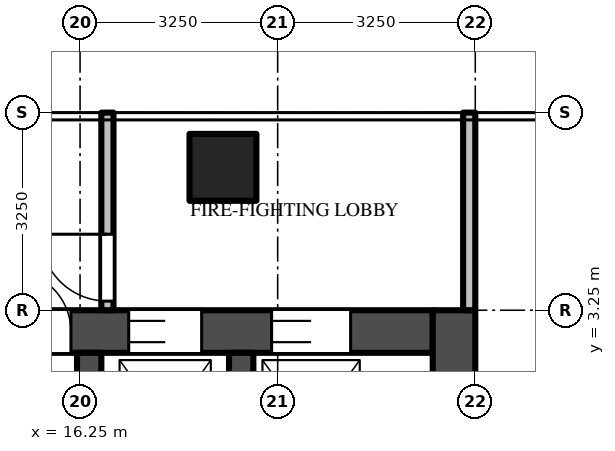
"""IFC4 building model, lengths in metres.
Left out: names, types, materials, properties, quantities, classifications, styles, units other than length and angle.
Written with IfcOpenShell. Run it as: python <this file> out.ifc"""

import sys

from ifc_helpers import new_model, si_unit, direction, frame, frame_2d, origin, origin_2d, place, context, subcontext, project, spatial, rectangle, extrude, source, transform, mapped, element, fill, save


model = new_model("IFC4")
c1 = context("Model", 3, precision=1e-05, world=origin(), true_north=direction((0.0, 1.0)))
c2 = subcontext(c1, "Body", "Model", "MODEL_VIEW")
j1 = project(units=[si_unit("LENGTHUNIT", "METRE"), si_unit("PLANEANGLEUNIT", "RADIAN")], contexts=[c1])
p1 = place(None, origin())
s1 = spatial("IfcSite", under=j1, at=p1, CompositionType="ELEMENT")
p2 = place(p1, origin())
s2 = spatial("IfcBuilding", under=s1, at=p2, CompositionType="ELEMENT")
p3 = place(p2, frame((0.0, 0.0, 212.7)))
s3 = spatial("IfcBuildingStorey", under=s2, at=p3, CompositionType="ELEMENT", Elevation=212.7)
m1 = source(origin(), c2, "Body", "SweptSolid", [
    extrude(rectangle(XDim=1.1, YDim=1.1, at=origin_2d()), origin(), (0.0, 0.0, 1.0), 8.0),
])
p4 = place(p3, frame((18.6, 5.6, 0.0), z_axis=(0.0, 0.0, 1.0), x_axis=(1.0, 0.0, 0.0)))
e1 = element("IfcColumn", 1, at=p4, inside=s3, PredefinedType="COLUMN", context=c2, shape_type="MappedRepresentation", body=[
    mapped(m1, transform((0.0, 0.0, 0.0))),
])
m2 = source(origin(), c2, "Body", "SweptSolid", [
    extrude(rectangle(XDim=14.85, YDim=0.7, at=frame_2d((7.425, 0.0))), origin(), (0.0, 0.0, 1.0), 7.8),
])
p5 = place(p3, frame((7.2, 2.9, 0.0), z_axis=(0.0, 0.0, 1.0), x_axis=(1.0, 0.0, 0.0)))
e2 = element("IfcWall", 2, at=p5, inside=s3, PredefinedType="SHEAR", context=c2, shape_type="MappedRepresentation", body=[
    mapped(m2, transform((0.0, 0.0, 0.0))),
])
m3 = source(origin(), c2, "Body", "SweptSolid", [
    extrude(rectangle(XDim=1.1, YDim=2.1, at=frame_2d((0.55, 1.05))), frame((0.0, 0.36, 0.0), z_axis=(0.0, -1.0, 0.0), x_axis=(1.0, 0.0, 0.0)), (0.0, 0.0, 1.0), 0.72),
])
p6 = place(p5, frame((0.55, 0.0, 0.0)))
e3 = element("IfcOpeningElement", 3, at=p6, cuts=e2, PredefinedType="OPENING", context=c2, shape_type="MappedRepresentation", body=[
    mapped(m3, transform((0.0, 0.0, 0.0))),
])
p7 = place(p5, frame((3.15, 0.0, 0.0)))
e4 = element("IfcOpeningElement", 4, at=p7, cuts=e2, PredefinedType="OPENING", context=c2, shape_type="MappedRepresentation", body=[
    mapped(m3, transform((0.0, 0.0, 0.0))),
])
m4 = source(origin(), c2, "Body", "SweptSolid", [
    extrude(rectangle(XDim=1.2, YDim=2.1, at=frame_2d((0.6, 1.05))), frame((0.0, 0.36, 0.0), z_axis=(0.0, -1.0, 0.0), x_axis=(1.0, 0.0, 0.0)), (0.0, 0.0, 1.0), 0.72),
])
p8 = place(p5, frame((5.7, 0.0, 0.0)))
e5 = element("IfcOpeningElement", 5, at=p8, cuts=e2, PredefinedType="OPENING", context=c2, shape_type="MappedRepresentation", body=[
    mapped(m4, transform((0.0, 0.0, 0.0))),
])
m5 = source(origin(), c2, "Body", "SweptSolid", [
    extrude(rectangle(XDim=1.3, YDim=2.1, at=frame_2d((0.65, 1.05))), frame((0.0, 0.36, 0.0), z_axis=(0.0, -1.0, 0.0), x_axis=(1.0, 0.0, 0.0)), (0.0, 0.0, 1.0), 0.72),
])
p9 = place(p5, frame((12.2, 0.0, 0.0)))
e6 = element("IfcOpeningElement", 6, at=p9, cuts=e2, PredefinedType="OPENING", context=c2, shape_type="MappedRepresentation", body=[
    mapped(m5, transform((0.0, 0.0, 0.0))),
])
p10 = place(p5, frame((9.85, 0.0, 0.0)))
e7 = element("IfcOpeningElement", 7, at=p10, cuts=e2, PredefinedType="OPENING", context=c2, shape_type="MappedRepresentation", body=[
    mapped(m4, transform((0.0, 0.0, 0.0))),
])
m6 = source(origin(), c2, "Body", "SweptSolid", [
    extrude(rectangle(XDim=1.0, YDim=2.1, at=frame_2d((0.5, 1.05))), frame((0.0, 0.36, 0.0), z_axis=(0.0, -1.0, 0.0), x_axis=(1.0, 0.0, 0.0)), (0.0, 0.0, 1.0), 0.72),
])
p11 = place(p5, frame((7.9, 0.0, 0.0)))
e8 = element("IfcOpeningElement", 8, at=p11, cuts=e2, PredefinedType="OPENING", context=c2, shape_type="MappedRepresentation", body=[
    mapped(m6, transform((0.0, 0.0, 0.0))),
])
m7 = source(origin(), c2, "Body", "SweptSolid", [
    extrude(rectangle(XDim=9.05, YDim=0.7, at=frame_2d((4.525, 0.0))), origin(), (0.0, 0.0, 1.0), 7.8),
])
p12 = place(p3, frame((22.4, -5.8, 0.0), z_axis=(0.0, 0.0, 1.0), x_axis=(0.0, 1.0, 0.0)))
e9 = element("IfcWall", 9, at=p12, inside=s3, PredefinedType="SHEAR", context=c2, shape_type="MappedRepresentation", body=[
    mapped(m7, transform((0.0, 0.0, 0.0))),
])
m8 = source(origin(), c2, "Body", "SweptSolid", [
    extrude(rectangle(XDim=2.45, YDim=0.4, at=frame_2d((1.225, 0.0))), origin(), (0.0, 0.0, 1.0), 7.8),
])
for number, where, z_axis, x_axis in (
    (10, (16.4, 0.1, 0.0), (0.0, 0.0, 1.0), (0.0, 1.0, 0.0)),
    (11, (18.9, 0.1, 0.0), (0.0, 0.0, 1.0), (0.0, 1.0, 0.0)),
):
    element("IfcWall", number, at=place(p3, frame(where, z_axis=z_axis, x_axis=x_axis)), inside=s3, PredefinedType="SHEAR", context=c2, shape_type="MappedRepresentation", body=[
        mapped(m8, transform((0.0, 0.0, 0.0))),
    ])
m9 = source(origin(), c2, "Body", "SweptSolid", [
    extrude(rectangle(XDim=3.25, YDim=0.2, at=frame_2d((1.625, 0.0))), origin(), (0.0, 0.0, 1.0), 7.8),
])
p13 = place(p3, frame((16.7, 3.25, 0.0), z_axis=(0.0, 0.0, 1.0), x_axis=(0.0, 1.0, 0.0)))
e12 = element("IfcWall", 12, at=p13, inside=s3, PredefinedType="PARTITIONING", context=c2, shape_type="MappedRepresentation", body=[
    mapped(m9, transform((0.0, 0.0, 0.0))),
])
m10 = source(origin(), c2, "Body", "SweptSolid", [
    extrude(rectangle(XDim=1.1, YDim=2.1, at=frame_2d((0.55, 1.05))), frame((0.0, 0.11, 0.0), z_axis=(0.0, -1.0, 0.0), x_axis=(1.0, 0.0, 0.0)), (0.0, 0.0, 1.0), 0.22),
])
p14 = place(p13, frame((0.15, 0.0, 0.0)))
e13 = element("IfcOpeningElement", 13, at=p14, cuts=e12, PredefinedType="OPENING", context=c2, shape_type="MappedRepresentation", body=[
    mapped(m10, transform((0.0, 0.0, 0.0))),
])
p15 = place(p3, frame((22.65, 3.25, 0.0), z_axis=(0.0, 0.0, 1.0), x_axis=(0.0, 1.0, 0.0)))
e14 = element("IfcWall", 14, at=p15, inside=s3, PredefinedType="PARTITIONING", context=c2, shape_type="MappedRepresentation", body=[
    mapped(m9, transform((0.0, 0.0, 0.0))),
])
m11 = source(origin(), c2, "Body", "SweptSolid", [
    extrude(rectangle(XDim=1.3, YDim=2.1, at=frame_2d((0.65, 1.05))), frame((0.0, -0.275, 0.0), z_axis=(0.0, -1.0, 0.0), x_axis=(1.0, 0.0, 0.0)), (0.0, 0.0, 1.0), 0.05),
])
p16 = place(p9, origin())
e15 = element("IfcDoor", 15, at=p16, inside=s3, OperationType="DOUBLE_DOOR_SLIDING", PredefinedType="DOOR", context=c2, shape_type="MappedRepresentation", body=[
    mapped(m11, transform((0.0, 0.0, 0.0))),
])
fill(e6, e15)
m12 = source(origin(), c2, "Body", "SweptSolid", [
    extrude(rectangle(XDim=1.2, YDim=2.1, at=frame_2d((0.6, 1.05))), frame((0.0, -0.275, 0.0), z_axis=(0.0, -1.0, 0.0), x_axis=(1.0, 0.0, 0.0)), (0.0, 0.0, 1.0), 0.05),
])
p17 = place(p10, origin())
e16 = element("IfcDoor", 16, at=p17, inside=s3, OperationType="DOUBLE_DOOR_SLIDING", PredefinedType="DOOR", context=c2, shape_type="MappedRepresentation", body=[
    mapped(m12, transform((0.0, 0.0, 0.0))),
])
fill(e7, e16)
m13 = source(origin(), c2, "Body", "SweptSolid", [
    extrude(rectangle(XDim=1.0, YDim=2.1, at=frame_2d((0.5, 1.05))), frame((0.0, -0.275, 0.0), z_axis=(0.0, -1.0, 0.0), x_axis=(1.0, 0.0, 0.0)), (0.0, 0.0, 1.0), 0.05),
])
p18 = place(p11, origin())
e17 = element("IfcDoor", 17, at=p18, inside=s3, OperationType="SINGLE_SWING_LEFT", PredefinedType="DOOR", context=c2, shape_type="MappedRepresentation", body=[
    mapped(m13, transform((0.0, 0.0, 0.0))),
])
fill(e8, e17)
m14 = source(origin(), c2, "Body", "SweptSolid", [
    extrude(rectangle(XDim=1.1, YDim=2.1, at=frame_2d((0.55, 1.05))), frame((0.0, 0.025, 0.0), z_axis=(0.0, -1.0, 0.0), x_axis=(1.0, 0.0, 0.0)), (0.0, 0.0, 1.0), 0.05),
])
p19 = place(p14, origin())
e18 = element("IfcDoor", 18, at=p19, inside=s3, OperationType="SINGLE_SWING_RIGHT", PredefinedType="DOOR", context=c2, shape_type="MappedRepresentation", body=[
    mapped(m14, transform((0.0, 0.0, 0.0))),
])
fill(e13, e18)
save(model, sys.argv[1])
